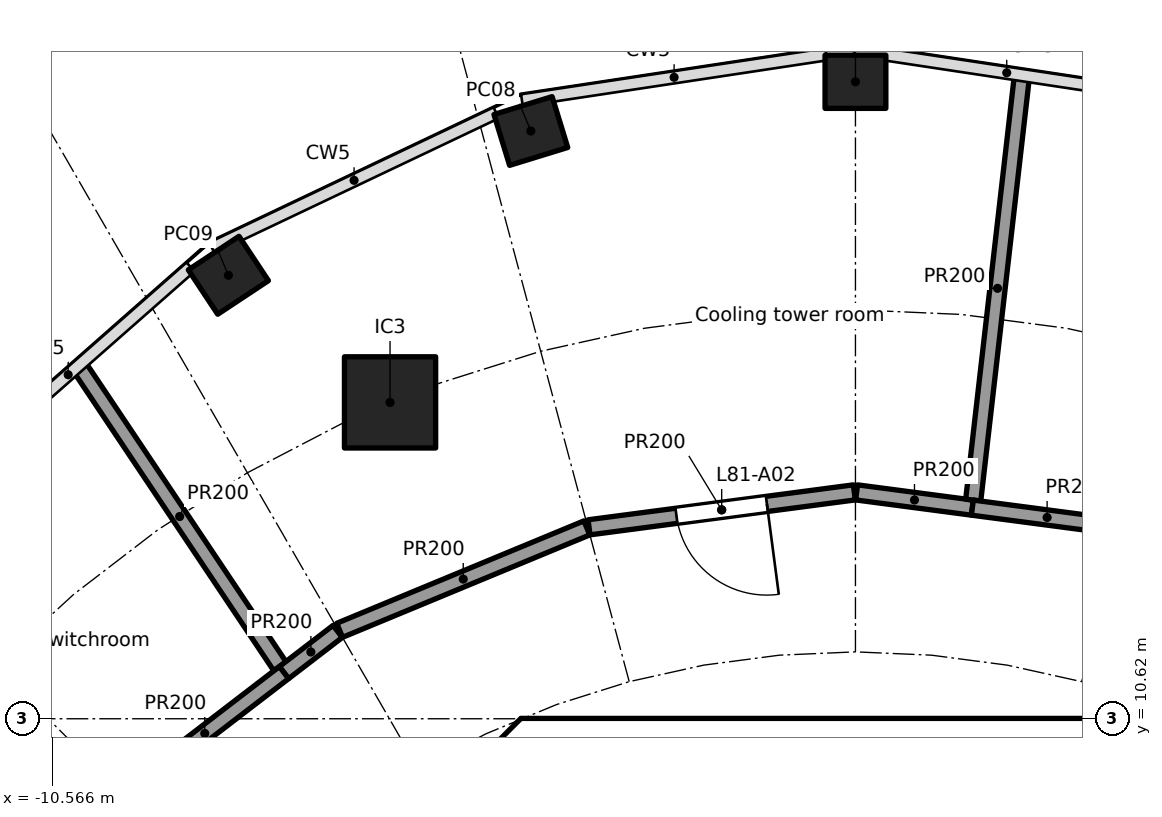
"""IFC4 building model, lengths in metres.
Left out: names, types, materials, properties, quantities, classifications, styles, units other than length and angle.
Written with IfcOpenShell. Run it as: python <this file> out.ifc"""

import sys

from ifc_helpers import new_model, si_unit, direction, frame, frame_2d, origin, origin_2d, place, context, subcontext, project, spatial, polyline, rectangle, hollow_rectangle, outline, extrude, element, fill, save


model = new_model("IFC4")
c1 = context("Model", 3, precision=1e-05, world=origin(), true_north=direction((0.0, 1.0)))
c2 = subcontext(c1, "Body", "Model", "MODEL_VIEW")
j1 = project(units=[si_unit("LENGTHUNIT", "METRE"), si_unit("PLANEANGLEUNIT", "RADIAN")], contexts=[c1])
p1 = place(None, origin())
s1 = spatial("IfcSite", under=j1, at=p1, CompositionType="ELEMENT")
p2 = place(p1, origin())
s2 = spatial("IfcBuilding", under=s1, at=p2, CompositionType="ELEMENT")
p3 = place(p2, frame((0.0, 0.0, 328.9)))
s3 = spatial("IfcBuildingStorey", under=s2, at=p3, CompositionType="ELEMENT", Elevation=328.9)
for number, where, z_axis, x_axis in (
    (1, (0.0, 19.0, 0.0), (0.0, 0.0, 1.0), (-1.0, 0.0, 0.0)),
    (2, (-4.271, 18.353, 0.0), (0.0, 0.0, 1.0), (-0.956, -0.294, 0.0)),
    (3, (-8.25, 16.455, 0.0), (0.0, 0.0, 1.0), (-0.834, -0.552, 0.0)),
):
    element("IfcColumn", number, at=place(p3, frame(where, z_axis=z_axis, x_axis=x_axis)), inside=s3, PredefinedType="COLUMN", context=c2, shape_type="SweptSolid", body=[
        extrude(hollow_rectangle(XDim=0.8, YDim=0.7, WallThickness=0.025, at=origin_2d()), origin(), (0.0, 0.0, 1.0), 4.0),
    ])
p4 = place(p3, frame((-6.123, 14.782, 0.0), z_axis=(0.0, 0.0, 1.0), x_axis=(1.0, 0.0, 0.0)))
e4 = element("IfcColumn", 4, at=p4, inside=s3, PredefinedType="COLUMN", context=c2, shape_type="SweptSolid", body=[
    extrude(rectangle(XDim=1.2, YDim=1.2, at=origin_2d()), origin(), (0.0, 0.0, 1.0), 4.0),
])
p5 = place(p3, origin())
e5 = element("IfcWall", 5, at=p5, inside=s3, PredefinedType="SHEAR", context=c2, shape_type="SweptSolid", body=[
    extrude(outline(polyline([(-4.152, 10.025), (-4.401, 9.776), (-4.825, 10.2), (-4.401, 10.625), (4.401, 10.625), (4.825, 10.2), (4.401, 9.776), (4.152, 10.025), (-4.152, 10.025)])), origin(), (0.0, 0.0, 1.0), 3.7),
])
p6 = place(p3, frame((-9.605, 9.626, 0.0), z_axis=(0.0, 0.0, 1.0), x_axis=(0.793395797287, 0.608706093979, 0.0)))
e6 = element("IfcWall", 6, at=p6, inside=s3, PredefinedType="PARTITIONING", context=c2, shape_type="SweptSolid", body=[
    extrude(rectangle(XDim=2.632, YDim=0.2, at=frame_2d((1.316, 0.0))), origin(), (0.0, 0.0, 1.0), 3.7),
])
p7 = place(p3, frame((-7.572, 11.311, 0.0), z_axis=(0.0, 0.0, 1.0), x_axis=(-0.55629198168, 0.830986901893, 0.0)))
e7 = element("IfcWall", 7, at=p7, inside=s3, PredefinedType="PARTITIONING", context=c2, shape_type="SweptSolid", body=[
    extrude(rectangle(XDim=4.74, YDim=0.2, at=frame_2d((2.37, 0.0))), origin(), (0.0, 0.0, 1.0), 3.7),
])
p8 = place(p3, frame((-7.517, 11.228, 0.0), z_axis=(0.0, 0.0, 1.0), x_axis=(0.793420478802, 0.608673922407, 0.0)))
e8 = element("IfcWall", 8, at=p8, inside=s3, PredefinedType="PARTITIONING", context=c2, shape_type="SweptSolid", body=[
    extrude(rectangle(XDim=0.888, YDim=0.2, at=frame_2d((0.444, 0.0))), origin(), (0.0, 0.0, 1.0), 3.7),
])
p9 = place(p3, frame((-6.786, 11.784, 0.0), z_axis=(0.0, 0.0, 1.0), x_axis=(0.92386297064, 0.382723413813, 0.0)))
e9 = element("IfcWall", 9, at=p9, inside=s3, PredefinedType="PARTITIONING", context=c2, shape_type="SweptSolid", body=[
    extrude(rectangle(XDim=3.52, YDim=0.2, at=frame_2d((1.76, 0.0))), origin(), (0.0, 0.0, 1.0), 3.7),
])
p10 = place(p3, frame((-3.505, 13.139, 0.0), z_axis=(0.0, 0.0, 1.0), x_axis=(0.991452406768, 0.130468866457, 0.0)))
e10 = element("IfcWall", 10, at=p10, inside=s3, PredefinedType="PARTITIONING", context=c2, shape_type="SweptSolid", body=[
    extrude(rectangle(XDim=3.52, YDim=0.2, at=frame_2d((1.76, 0.0))), origin(), (0.0, 0.0, 1.0), 3.7),
])
p11 = place(p10, frame((1.16, 0.0, 0.0)))
e11 = element("IfcOpeningElement", 11, at=p11, cuts=e10, PredefinedType="OPENING", context=c2, shape_type="SweptSolid", body=[
    extrude(rectangle(XDim=1.2, YDim=2.1, at=frame_2d((0.6, 1.05))), frame((0.0, 0.11, 0.0), z_axis=(0.0, -1.0, 0.0), x_axis=(1.0, 0.0, 0.0)), (0.0, 0.0, 1.0), 0.22),
])
p12 = place(p3, frame((0.015, 13.598, 0.0), z_axis=(0.0, 0.0, 1.0), x_axis=(0.991449967232, -0.13048740351, 0.0)))
e12 = element("IfcWall", 12, at=p12, inside=s3, PredefinedType="PARTITIONING", context=c2, shape_type="SweptSolid", body=[
    extrude(rectangle(XDim=1.536, YDim=0.2, at=frame_2d((0.768, 0.0))), origin(), (0.0, 0.0, 1.0), 3.7),
])
p13 = place(p3, frame((1.55, 13.497, 0.0), z_axis=(0.0, 0.0, 1.0), x_axis=(0.114057329834, 0.993474169524, 0.0)))
e13 = element("IfcWall", 13, at=p13, inside=s3, PredefinedType="PARTITIONING", context=c2, shape_type="SweptSolid", body=[
    extrude(rectangle(XDim=5.608, YDim=0.2, at=frame_2d((2.804, 0.0))), origin(), (0.0, 0.0, 1.0), 3.7),
])
p14 = place(p3, frame((1.538, 13.397, 0.0), z_axis=(0.0, 0.0, 1.0), x_axis=(0.991454295543, -0.130454512571, 0.0)))
e14 = element("IfcWall", 14, at=p14, inside=s3, PredefinedType="PARTITIONING", context=c2, shape_type="SweptSolid", body=[
    extrude(rectangle(XDim=1.984, YDim=0.2, at=frame_2d((0.992, 0.0))), origin(), (0.0, 0.0, 1.0), 3.7),
])
p15 = place(p11, frame((1.2, 0.0, 0.0), x_axis=(-1.0, 0.0, 0.0)))
e15 = element("IfcDoor", 15, at=p15, inside=s3, OperationType="SINGLE_SWING_LEFT", PredefinedType="DOOR", context=c2, shape_type="SweptSolid", body=[
    extrude(rectangle(XDim=1.2, YDim=2.1, at=frame_2d((0.6, 1.05))), frame((0.0, 0.025, 0.0), z_axis=(0.0, -1.0, 0.0), x_axis=(1.0, 0.0, 0.0)), (0.0, 0.0, 1.0), 0.05),
])
fill(e11, e15)
save(model, sys.argv[1])
